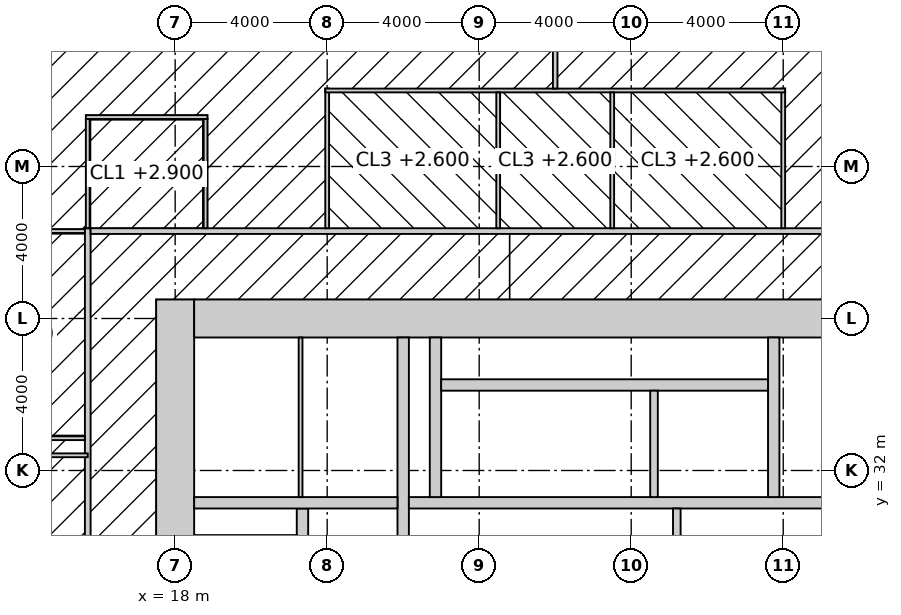
"""IFC4 building model, lengths in metres.
Left out: names, types, materials, properties, quantities, classifications, styles, units other than length and angle.
Written with IfcOpenShell. Run it as: python <this file> out.ifc"""

import sys

from ifc_helpers import new_model, si_unit, direction, frame, frame_2d, origin, place, context, subcontext, project, spatial, rectangle, extrude, element, fill, save


model = new_model("IFC4")
c1 = context("Model", 3, precision=1e-05, world=origin(), true_north=direction((0.0, 1.0)))
c2 = subcontext(c1, "Body", "Model", "MODEL_VIEW")
j1 = project(units=[si_unit("LENGTHUNIT", "METRE"), si_unit("PLANEANGLEUNIT", "RADIAN")], contexts=[c1])
p1 = place(None, origin())
s1 = spatial("IfcSite", under=j1, at=p1, CompositionType="ELEMENT")
p2 = place(p1, origin())
s2 = spatial("IfcBuilding", under=s1, at=p2, CompositionType="ELEMENT")
p3 = place(p2, frame((0.0, 0.0, 286.2)))
s3 = spatial("IfcBuildingStorey", under=s2, at=p3, CompositionType="ELEMENT", Elevation=286.2)
p4 = place(p3, frame((18.0, 17.5, -0.15), z_axis=(0.0, 0.0, 1.0), x_axis=(0.0, 1.0, 0.0)))
e1 = element("IfcWall", 1, at=p4, inside=s3, PredefinedType="SHEAR", context=c2, shape_type="SweptSolid", body=[
    extrude(rectangle(XDim=19.0, YDim=1.0, at=frame_2d((9.5, 0.0))), origin(), (0.0, 0.0, 1.0), 4.0),
])
p5 = place(p3, frame((18.5, 36.0, -0.15), z_axis=(0.0, 0.0, 1.0), x_axis=(1.0, 0.0, 0.0)))
e2 = element("IfcWall", 2, at=p5, inside=s3, PredefinedType="SHEAR", context=c2, shape_type="SweptSolid", body=[
    extrude(rectangle(XDim=17.6, YDim=1.0, at=frame_2d((8.8, 0.0))), origin(), (0.0, 0.0, 1.0), 4.0),
])
p6 = place(p3, frame((24.0, 18.5, -0.15), z_axis=(0.0, 0.0, 1.0), x_axis=(0.0, 1.0, 0.0)))
e3 = element("IfcWall", 3, at=p6, inside=s3, PredefinedType="SHEAR", context=c2, shape_type="SweptSolid", body=[
    extrude(rectangle(XDim=17.0, YDim=0.3, at=frame_2d((8.5, 0.0))), origin(), (0.0, 0.0, 1.0), 4.0),
])
p7 = place(p6, frame((9.6, 0.0, 0.15)))
e4 = element("IfcOpeningElement", 4, at=p7, cuts=e3, PredefinedType="OPENING", context=c2, shape_type="SweptSolid", body=[
    extrude(rectangle(XDim=1.5, YDim=2.4, at=frame_2d((0.75, 1.2))), frame((0.0, 0.16, 0.0), z_axis=(0.0, -1.0, 0.0), x_axis=(1.0, 0.0, 0.0)), (0.0, 0.0, 1.0), 0.32),
])
p8 = place(p3, frame((24.15, 31.15, -0.15), z_axis=(0.0, 0.0, 1.0), x_axis=(1.0, 0.0, 0.0)))
e5 = element("IfcWall", 5, at=p8, inside=s3, PredefinedType="SHEAR", context=c2, shape_type="SweptSolid", body=[
    extrude(rectangle(XDim=11.25, YDim=0.3, at=frame_2d((5.625, 0.0))), origin(), (0.0, 0.0, 1.0), 4.0),
])
p9 = place(p8, frame((3.15, 0.0, 0.15)))
e6 = element("IfcOpeningElement", 6, at=p9, cuts=e5, PredefinedType="OPENING", context=c2, shape_type="SweptSolid", body=[
    extrude(rectangle(XDim=1.0, YDim=2.2, at=frame_2d((0.5, 1.1))), frame((0.0, 0.16, 0.0), z_axis=(0.0, -1.0, 0.0), x_axis=(1.0, 0.0, 0.0)), (0.0, 0.0, 1.0), 0.32),
])
p10 = place(p8, frame((7.25, 0.0, 0.15)))
e7 = element("IfcOpeningElement", 7, at=p10, cuts=e5, PredefinedType="OPENING", context=c2, shape_type="SweptSolid", body=[
    extrude(rectangle(XDim=1.4, YDim=2.4, at=frame_2d((0.7, 1.2))), frame((0.0, 0.16, 0.0), z_axis=(0.0, -1.0, 0.0), x_axis=(1.0, 0.0, 0.0)), (0.0, 0.0, 1.0), 0.32),
])
p11 = place(p3, frame((21.35, 18.5, -0.15), z_axis=(0.0, 0.0, 1.0), x_axis=(0.0, 1.0, 0.0)))
e8 = element("IfcWall", 8, at=p11, inside=s3, PredefinedType="SHEAR", context=c2, shape_type="SweptSolid", body=[
    extrude(rectangle(XDim=12.5, YDim=0.3, at=frame_2d((6.25, 0.0))), origin(), (0.0, 0.0, 1.0), 4.0),
])
p12 = place(p11, frame((0.875, 0.0, 0.15)))
e9 = element("IfcOpeningElement", 9, at=p12, cuts=e8, PredefinedType="OPENING", context=c2, shape_type="SweptSolid", body=[
    extrude(rectangle(XDim=1.1, YDim=2.2, at=frame_2d((0.55, 1.1))), frame((0.0, 0.16, 0.0), z_axis=(0.0, -1.0, 0.0), x_axis=(1.0, 0.0, 0.0)), (0.0, 0.0, 1.0), 0.32),
])
p13 = place(p11, frame((3.825, 0.0, 0.15)))
e10 = element("IfcOpeningElement", 10, at=p13, cuts=e8, PredefinedType="OPENING", context=c2, shape_type="SweptSolid", body=[
    extrude(rectangle(XDim=1.1, YDim=2.2, at=frame_2d((0.55, 1.1))), frame((0.0, 0.16, 0.0), z_axis=(0.0, -1.0, 0.0), x_axis=(1.0, 0.0, 0.0)), (0.0, 0.0, 1.0), 0.32),
])
p14 = place(p11, frame((6.675, 0.0, 0.15)))
e11 = element("IfcOpeningElement", 11, at=p14, cuts=e8, PredefinedType="OPENING", context=c2, shape_type="SweptSolid", body=[
    extrude(rectangle(XDim=1.1, YDim=2.2, at=frame_2d((0.55, 1.1))), frame((0.0, 0.16, 0.0), z_axis=(0.0, -1.0, 0.0), x_axis=(1.0, 0.0, 0.0)), (0.0, 0.0, 1.0), 0.32),
])
p15 = place(p11, frame((9.575, 0.0, 0.15)))
e12 = element("IfcOpeningElement", 12, at=p15, cuts=e8, PredefinedType="OPENING", context=c2, shape_type="SweptSolid", body=[
    extrude(rectangle(XDim=1.1, YDim=2.2, at=frame_2d((0.55, 1.1))), frame((0.0, 0.16, 0.0), z_axis=(0.0, -1.0, 0.0), x_axis=(1.0, 0.0, 0.0)), (0.0, 0.0, 1.0), 0.32),
])
p16 = place(p3, frame((18.5, 31.15, -0.15), z_axis=(0.0, 0.0, 1.0), x_axis=(1.0, 0.0, 0.0)))
e13 = element("IfcWall", 13, at=p16, inside=s3, PredefinedType="SHEAR", context=c2, shape_type="SweptSolid", body=[
    extrude(rectangle(XDim=5.35, YDim=0.3, at=frame_2d((2.675, 0.0))), origin(), (0.0, 0.0, 1.0), 4.0),
])
p17 = place(p16, frame((3.4, 0.0, 0.15)))
e14 = element("IfcOpeningElement", 14, at=p17, cuts=e13, PredefinedType="OPENING", context=c2, shape_type="SweptSolid", body=[
    extrude(rectangle(XDim=1.0, YDim=2.2, at=frame_2d((0.5, 1.1))), frame((0.0, 0.16, 0.0), z_axis=(0.0, -1.0, 0.0), x_axis=(1.0, 0.0, 0.0)), (0.0, 0.0, 1.0), 0.32),
])
for number, where, z_axis, x_axis in (
    (15, (24.85, 31.3, -0.15), (0.0, 0.0, 1.0), (0.0, 1.0, 0.0)),
    (16, (33.75, 31.3, -0.15), (0.0, 0.0, 1.0), (0.0, 1.0, 0.0)),
):
    element("IfcWall", number, at=place(p3, frame(where, z_axis=z_axis, x_axis=x_axis)), inside=s3, PredefinedType="SHEAR", context=c2, shape_type="SweptSolid", body=[
        extrude(rectangle(XDim=4.2, YDim=0.3, at=frame_2d((2.1, 0.0))), origin(), (0.0, 0.0, 1.0), 4.0),
    ])
p18 = place(p3, frame((25.0, 34.25, -0.15), z_axis=(0.0, 0.0, 1.0), x_axis=(1.0, 0.0, 0.0)))
e17 = element("IfcWall", 17, at=p18, inside=s3, PredefinedType="SHEAR", context=c2, shape_type="SweptSolid", body=[
    extrude(rectangle(XDim=8.6, YDim=0.3, at=frame_2d((4.3, 0.0))), origin(), (0.0, 0.0, 1.0), 4.0),
])
p19 = place(p3, frame((30.6, 31.3, -0.15), z_axis=(0.0, 0.0, 1.0), x_axis=(0.0, 1.0, 0.0)))
e18 = element("IfcWall", 18, at=p19, inside=s3, PredefinedType="SOLIDWALL", context=c2, shape_type="SweptSolid", body=[
    extrude(rectangle(XDim=2.8, YDim=0.2, at=frame_2d((1.4, 0.0))), origin(), (0.0, 0.0, 1.0), 4.0),
])
p20 = place(p3, frame((31.2, 26.7, 0.0), z_axis=(0.0, 0.0, 1.0), x_axis=(0.0, 1.0, 0.0)))
e19 = element("IfcWall", 19, at=p20, inside=s3, PredefinedType="SOLIDWALL", context=c2, shape_type="SweptSolid", body=[
    extrude(rectangle(XDim=4.3, YDim=0.2, at=frame_2d((2.15, 0.0))), origin(), (0.0, 0.0, 1.0), 3.85),
])
p21 = place(p3, frame((21.3, 31.3, 0.0), z_axis=(0.0, 0.0, 1.0), x_axis=(0.0, 1.0, 0.0)))
e20 = element("IfcWall", 20, at=p21, inside=s3, PredefinedType="PARTITIONING", context=c2, shape_type="SweptSolid", body=[
    extrude(rectangle(XDim=4.2, YDim=0.1, at=frame_2d((2.1, 0.0))), origin(), (0.0, 0.0, 1.0), 3.85),
])
p22 = place(p21, frame((1.55, 0.0, 0.0)))
e21 = element("IfcOpeningElement", 21, at=p22, cuts=e20, PredefinedType="OPENING", context=c2, shape_type="SweptSolid", body=[
    extrude(rectangle(XDim=1.0, YDim=2.2, at=frame_2d((0.5, 1.1))), frame((0.0, 0.06, 0.0), z_axis=(0.0, -1.0, 0.0), x_axis=(1.0, 0.0, 0.0)), (0.0, 0.0, 1.0), 0.12),
])
p23 = place(p3, frame((15.7, 15.025, 0.0), z_axis=(0.0, 0.0, 1.0), x_axis=(0.0, 1.0, 0.0)))
e22 = element("IfcWall", 22, at=p23, inside=s3, PredefinedType="PARTITIONING", context=c2, shape_type="SweptSolid", body=[
    extrude(rectangle(XDim=23.35, YDim=0.15, at=frame_2d((11.675, 0.0))), origin(), (0.0, 0.0, 1.0), 3.85),
])
p24 = place(p23, frame((3.275, 0.0, 0.0)))
e23 = element("IfcOpeningElement", 23, at=p24, cuts=e22, PredefinedType="OPENING", context=c2, shape_type="SweptSolid", body=[
    extrude(rectangle(XDim=1.8, YDim=2.4, at=frame_2d((0.9, 1.2))), frame((0.0, 0.085, 0.0), z_axis=(0.0, -1.0, 0.0), x_axis=(1.0, 0.0, 0.0)), (0.0, 0.0, 1.0), 0.17),
])
p25 = place(p23, frame((14.825, 0.0, 0.0)))
e24 = element("IfcOpeningElement", 24, at=p25, cuts=e22, PredefinedType="OPENING", context=c2, shape_type="SweptSolid", body=[
    extrude(rectangle(XDim=1.8, YDim=2.4, at=frame_2d((0.9, 1.2))), frame((0.0, 0.085, 0.0), z_axis=(0.0, -1.0, 0.0), x_axis=(1.0, 0.0, 0.0)), (0.0, 0.0, 1.0), 0.17),
])
p26 = place(p3, frame((15.775, 38.3, 0.0), z_axis=(0.0, 0.0, 1.0), x_axis=(1.0, 0.0, 0.0)))
e25 = element("IfcWall", 25, at=p26, inside=s3, PredefinedType="PARTITIONING", context=c2, shape_type="SweptSolid", body=[
    extrude(rectangle(XDim=22.65, YDim=0.15, at=frame_2d((11.325, 0.0))), origin(), (0.0, 0.0, 1.0), 3.85),
])
p27 = place(p26, frame((7.975, 0.0, 0.0)))
e26 = element("IfcOpeningElement", 26, at=p27, cuts=e25, PredefinedType="OPENING", context=c2, shape_type="SweptSolid", body=[
    extrude(rectangle(XDim=0.9, YDim=2.1, at=frame_2d((0.45, 1.05))), frame((0.0, 0.085, 0.0), z_axis=(0.0, -1.0, 0.0), x_axis=(1.0, 0.0, 0.0)), (0.0, 0.0, 1.0), 0.17),
])
p28 = place(p26, frame((11.725, 0.0, 0.0)))
e27 = element("IfcOpeningElement", 27, at=p28, cuts=e25, PredefinedType="OPENING", context=c2, shape_type="SweptSolid", body=[
    extrude(rectangle(XDim=1.0, YDim=2.1, at=frame_2d((0.5, 1.05))), frame((0.0, 0.085, 0.0), z_axis=(0.0, -1.0, 0.0), x_axis=(1.0, 0.0, 0.0)), (0.0, 0.0, 1.0), 0.17),
])
p29 = place(p26, frame((15.575, 0.0, 0.0)))
e28 = element("IfcOpeningElement", 28, at=p29, cuts=e25, PredefinedType="OPENING", context=c2, shape_type="SweptSolid", body=[
    extrude(rectangle(XDim=0.9, YDim=2.1, at=frame_2d((0.45, 1.05))), frame((0.0, 0.085, 0.0), z_axis=(0.0, -1.0, 0.0), x_axis=(1.0, 0.0, 0.0)), (0.0, 0.0, 1.0), 0.17),
])
for number, where, z_axis, x_axis in (
    (29, (22.0, 38.375, 0.0), (0.0, 0.0, 1.0), (0.0, 1.0, 0.0)),
    (30, (34.0, 38.375, 0.0), (0.0, 0.0, 1.0), (0.0, 1.0, 0.0)),
):
    element("IfcWall", number, at=place(p3, frame(where, z_axis=z_axis, x_axis=x_axis)), inside=s3, PredefinedType="PARTITIONING", context=c2, shape_type="SweptSolid", body=[
        extrude(rectangle(XDim=3.675, YDim=0.1, at=frame_2d((1.837, 0.0))), origin(), (0.0, 0.0, 1.0), 2.95),
    ])
p30 = place(p3, frame((21.95, 42.0, 0.0), z_axis=(0.0, 0.0, 1.0), x_axis=(1.0, 0.0, 0.0)))
e31 = element("IfcWall", 31, at=p30, inside=s3, PredefinedType="PARTITIONING", context=c2, shape_type="SweptSolid", body=[
    extrude(rectangle(XDim=12.1, YDim=0.1, at=frame_2d((6.05, 0.0))), origin(), (0.0, 0.0, 1.0), 3.85),
])
for number, where, z_axis, x_axis in (
    (32, (26.5, 38.375, 0.0), (0.0, 0.0, 1.0), (0.0, 1.0, 0.0)),
    (33, (29.5, 38.375, 0.0), (0.0, 0.0, 1.0), (0.0, 1.0, 0.0)),
):
    element("IfcWall", number, at=place(p3, frame(where, z_axis=z_axis, x_axis=x_axis)), inside=s3, PredefinedType="PARTITIONING", context=c2, shape_type="SweptSolid", body=[
        extrude(rectangle(XDim=3.575, YDim=0.1, at=frame_2d((1.788, 0.0))), origin(), (0.0, 0.0, 1.0), 3.85),
    ])
p31 = place(p3, frame((28.0, 42.05, 0.0), z_axis=(0.0, 0.0, 1.0), x_axis=(0.0, 1.0, 0.0)))
e34 = element("IfcWall", 34, at=p31, inside=s3, PredefinedType="PARTITIONING", context=c2, shape_type="SweptSolid", body=[
    extrude(rectangle(XDim=1.65, YDim=0.12, at=frame_2d((0.825, 0.0))), origin(), (0.0, 0.0, 1.0), 3.85),
])
for number, where, z_axis, x_axis in (
    (35, (10.85, 32.85, 0.0), (0.0, 0.0, 1.0), (1.0, 0.0, 0.0)),
    (36, (10.85, 38.3, 0.0), (0.0, 0.0, 1.0), (1.0, 0.0, 0.0)),
):
    element("IfcWall", number, at=place(p3, frame(where, z_axis=z_axis, x_axis=x_axis)), inside=s3, PredefinedType="PARTITIONING", context=c2, shape_type="SweptSolid", body=[
        extrude(rectangle(XDim=4.775, YDim=0.1, at=frame_2d((2.387, 0.0))), origin(), (0.0, 0.0, 1.0), 3.85),
    ])
p32 = place(p3, frame((15.65, 41.3, 0.0), z_axis=(0.0, 0.0, 1.0), x_axis=(1.0, 0.0, 0.0)))
e37 = element("IfcWall", 37, at=p32, inside=s3, PredefinedType="PARTITIONING", context=c2, shape_type="SweptSolid", body=[
    extrude(rectangle(XDim=3.2, YDim=0.1, at=frame_2d((1.6, 0.0))), origin(), (0.0, 0.0, 1.0), 3.85),
])
p33 = place(p32, frame((1.1, 0.0, 0.0)))
e38 = element("IfcOpeningElement", 38, at=p33, cuts=e37, PredefinedType="OPENING", context=c2, shape_type="SweptSolid", body=[
    extrude(rectangle(XDim=1.0, YDim=2.2, at=frame_2d((0.5, 1.1))), frame((0.0, 0.06, 0.0), z_axis=(0.0, -1.0, 0.0), x_axis=(1.0, 0.0, 0.0)), (0.0, 0.0, 1.0), 0.12),
])
for number, where, z_axis, x_axis in (
    (39, (15.7, 38.375, 0.0), (0.0, 0.0, 1.0), (0.0, 1.0, 0.0)),
    (40, (18.8, 38.375, 0.0), (0.0, 0.0, 1.0), (0.0, 1.0, 0.0)),
):
    element("IfcWall", number, at=place(p3, frame(where, z_axis=z_axis, x_axis=x_axis)), inside=s3, PredefinedType="PARTITIONING", context=c2, shape_type="SweptSolid", body=[
        extrude(rectangle(XDim=2.875, YDim=0.1, at=frame_2d((1.438, 0.0))), origin(), (0.0, 0.0, 1.0), 3.85),
    ])
p34 = place(p3, frame((15.7, 32.4, 0.0), z_axis=(0.0, 0.0, 1.0), x_axis=(-1.0, 0.0, 0.0)))
e41 = element("IfcWall", 41, at=p34, inside=s3, PredefinedType="PARTITIONING", context=c2, shape_type="SweptSolid", body=[
    extrude(rectangle(XDim=4.5, YDim=0.1, at=frame_2d((2.25, 0.0))), origin(), (0.0, 0.0, 1.0), 3.85),
])
p35 = place(p17, origin())
e42 = element("IfcDoor", 42, at=p35, inside=s3, OperationType="SINGLE_SWING_LEFT", PredefinedType="DOOR", context=c2, shape_type="SweptSolid", body=[
    extrude(rectangle(XDim=1.0, YDim=2.2, at=frame_2d((0.5, 1.1))), frame((0.0, 0.025, 0.0), z_axis=(0.0, -1.0, 0.0), x_axis=(1.0, 0.0, 0.0)), (0.0, 0.0, 1.0), 0.05),
])
fill(e14, e42)
p36 = place(p22, origin())
e43 = element("IfcDoor", 43, at=p36, inside=s3, OperationType="SINGLE_SWING_LEFT", PredefinedType="DOOR", context=c2, shape_type="SweptSolid", body=[
    extrude(rectangle(XDim=1.0, YDim=2.2, at=frame_2d((0.5, 1.1))), frame((0.0, 0.025, 0.0), z_axis=(0.0, -1.0, 0.0), x_axis=(1.0, 0.0, 0.0)), (0.0, 0.0, 1.0), 0.05),
])
fill(e21, e43)
p37 = place(p9, origin())
e44 = element("IfcDoor", 44, at=p37, inside=s3, OperationType="SINGLE_SWING_LEFT", PredefinedType="DOOR", context=c2, shape_type="SweptSolid", body=[
    extrude(rectangle(XDim=1.0, YDim=2.2, at=frame_2d((0.5, 1.1))), frame((0.0, 0.025, 0.0), z_axis=(0.0, -1.0, 0.0), x_axis=(1.0, 0.0, 0.0)), (0.0, 0.0, 1.0), 0.05),
])
fill(e6, e44)
p38 = place(p27, origin())
e45 = element("IfcDoor", 45, at=p38, inside=s3, OperationType="SINGLE_SWING_LEFT", PredefinedType="DOOR", context=c2, shape_type="SweptSolid", body=[
    extrude(rectangle(XDim=0.9, YDim=2.1, at=frame_2d((0.45, 1.05))), frame((0.0, 0.025, 0.0), z_axis=(0.0, -1.0, 0.0), x_axis=(1.0, 0.0, 0.0)), (0.0, 0.0, 1.0), 0.05),
])
fill(e26, e45)
p39 = place(p28, origin())
e46 = element("IfcDoor", 46, at=p39, inside=s3, OperationType="SLIDING_TO_LEFT", PredefinedType="DOOR", context=c2, shape_type="SweptSolid", body=[
    extrude(rectangle(XDim=1.0, YDim=2.1, at=frame_2d((0.5, 1.05))), frame((0.0, 0.025, 0.0), z_axis=(0.0, -1.0, 0.0), x_axis=(1.0, 0.0, 0.0)), (0.0, 0.0, 1.0), 0.05),
])
fill(e27, e46)
p40 = place(p29, origin())
e47 = element("IfcDoor", 47, at=p40, inside=s3, OperationType="SINGLE_SWING_LEFT", PredefinedType="DOOR", context=c2, shape_type="SweptSolid", body=[
    extrude(rectangle(XDim=0.9, YDim=2.1, at=frame_2d((0.45, 1.05))), frame((0.0, 0.025, 0.0), z_axis=(0.0, -1.0, 0.0), x_axis=(1.0, 0.0, 0.0)), (0.0, 0.0, 1.0), 0.05),
])
fill(e28, e47)
p41 = place(p25, origin())
e48 = element("IfcDoor", 48, at=p41, inside=s3, OperationType="DOUBLE_DOOR_DOUBLE_SWING", PredefinedType="DOOR", context=c2, shape_type="SweptSolid", body=[
    extrude(rectangle(XDim=1.8, YDim=2.4, at=frame_2d((0.9, 1.2))), frame((0.0, 0.025, 0.0), z_axis=(0.0, -1.0, 0.0), x_axis=(1.0, 0.0, 0.0)), (0.0, 0.0, 1.0), 0.05),
])
fill(e24, e48)
p42 = place(p33, origin())
e49 = element("IfcDoor", 49, at=p42, inside=s3, OperationType="SINGLE_SWING_LEFT", PredefinedType="DOOR", context=c2, shape_type="SweptSolid", body=[
    extrude(rectangle(XDim=1.0, YDim=2.2, at=frame_2d((0.5, 1.1))), frame((0.0, 0.025, 0.0), z_axis=(0.0, -1.0, 0.0), x_axis=(1.0, 0.0, 0.0)), (0.0, 0.0, 1.0), 0.05),
])
fill(e38, e49)
p43 = place(p10, origin())
e50 = element("IfcDoor", 50, at=p43, inside=s3, OperationType="DOUBLE_DOOR_SLIDING", PredefinedType="DOOR", context=c2, shape_type="SweptSolid", body=[
    extrude(rectangle(XDim=1.4, YDim=2.4, at=frame_2d((0.7, 1.2))), frame((0.0, 0.025, 0.0), z_axis=(0.0, -1.0, 0.0), x_axis=(1.0, 0.0, 0.0)), (0.0, 0.0, 1.0), 0.05),
])
fill(e7, e50)
save(model, sys.argv[1])
